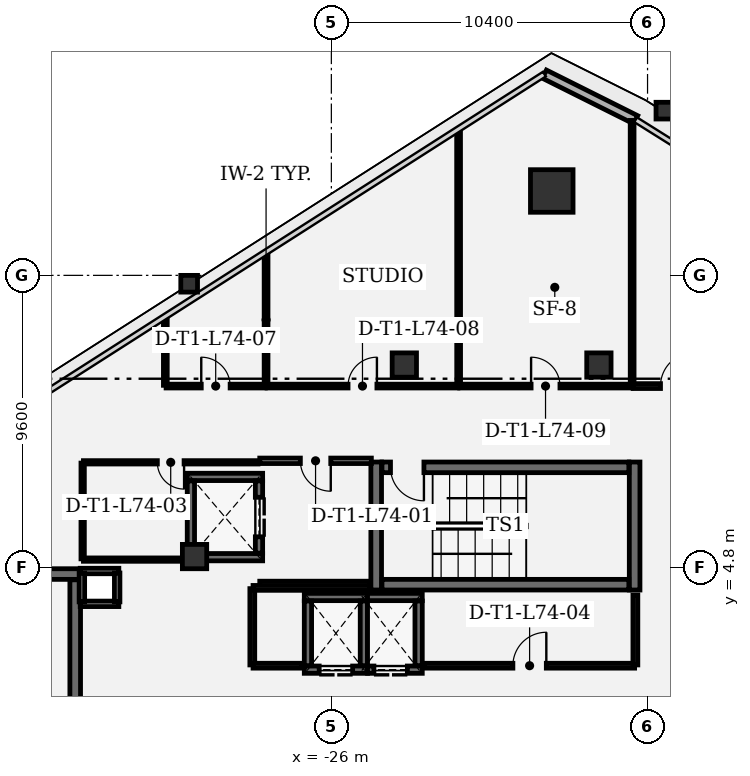
"""IFC4 building model, lengths in metres.
Left out: names, types, materials, properties, quantities, classifications, styles, units other than length and angle.
Written with IfcOpenShell. Run it as: python <this file> out.ifc"""

import sys

from ifc_helpers import new_model, si_unit, direction, frame, frame_2d, origin, origin_2d, place, context, subcontext, project, spatial, rectangle, extrude, element, fill, save


model = new_model("IFC4")
c1 = context("Model", 3, precision=1e-05, world=origin(), true_north=direction((0.0, 1.0)))
c2 = subcontext(c1, "Body", "Model", "MODEL_VIEW")
j1 = project(units=[si_unit("LENGTHUNIT", "METRE"), si_unit("PLANEANGLEUNIT", "RADIAN")], contexts=[c1])
p1 = place(None, origin())
s1 = spatial("IfcSite", under=j1, at=p1, CompositionType="ELEMENT")
p2 = place(p1, origin())
s2 = spatial("IfcBuilding", under=s1, at=p2, CompositionType="ELEMENT")
p3 = place(p2, frame((0.0, 0.0, 318.6)))
s3 = spatial("IfcBuildingStorey", under=s2, at=p3, CompositionType="ELEMENT", Elevation=318.6)
p4 = place(p3, frame((-18.75, 17.176, 0.0), z_axis=(0.0, 0.0, 1.0), x_axis=(1.0, 0.0, 0.0)))
e1 = element("IfcColumn", 1, at=p4, inside=s3, PredefinedType="COLUMN", context=c2, shape_type="SweptSolid", body=[
    extrude(rectangle(XDim=1.4, YDim=1.4, at=origin_2d()), origin(), (0.0, 0.0, 1.0), 4.2),
])
for number, where, z_axis, x_axis in (
    (2, (-23.6, 11.45, 0.0), (0.0, 0.0, 1.0), (1.0, 0.0, 0.0)),
    (3, (-17.2, 11.45, 0.0), (0.0, 0.0, 1.0), (1.0, 0.0, 0.0)),
    (4, (-30.5, 5.15, 0.0), (0.0, 0.0, 1.0), (1.0, 0.0, 0.0)),
):
    element("IfcColumn", number, at=place(p3, frame(where, z_axis=z_axis, x_axis=x_axis)), inside=s3, PredefinedType="COLUMN", context=c2, shape_type="SweptSolid", body=[
        extrude(rectangle(XDim=0.8, YDim=0.8, at=origin_2d()), origin(), (0.0, 0.0, 1.0), 4.2),
    ])
for number, where, z_axis, x_axis in (
    (5, (-30.677, 14.124, 0.0), (0.0, 0.0, 1.0), (1.0, 0.0, 0.0)),
    (6, (-15.046, 19.818, 0.0), (0.0, 0.0, 1.0), (1.0, 0.0, 0.0)),
):
    element("IfcColumn", number, at=place(p3, frame(where, z_axis=z_axis, x_axis=x_axis)), inside=s3, PredefinedType="COLUMN", context=c2, shape_type="SweptSolid", body=[
        extrude(rectangle(XDim=0.55, YDim=0.55, at=origin_2d()), origin(), (0.0, 0.0, 1.0), 4.2),
    ])
p5 = place(p3, frame((-18.993, 21.019, 0.0), z_axis=(0.0, 0.0, 1.0), x_axis=(0.894441735477, -0.447184505362, 0.0)))
e7 = element("IfcWall", 7, at=p5, inside=s3, PredefinedType="SOLIDWALL", context=c2, shape_type="SweptSolid", body=[
    extrude(rectangle(XDim=3.357, YDim=0.3, at=frame_2d((1.678, 0.0))), origin(), (0.0, 0.0, 1.0), 3.91),
])
for number, where, z_axis, x_axis in (
    (8, (-24.525, 8.26, 0.0), (0.0, 0.0, 1.0), (0.0, -1.0, 0.0)),
    (9, (-16.025, 4.05, 0.0), (0.0, 0.0, 1.0), (0.0, 1.0, 0.0)),
):
    element("IfcWall", number, at=place(p3, frame(where, z_axis=z_axis, x_axis=x_axis)), inside=s3, PredefinedType="SHEAR", context=c2, shape_type="SweptSolid", body=[
        extrude(rectangle(XDim=4.21, YDim=0.35, at=frame_2d((2.105, 0.0))), origin(), (0.0, 0.0, 1.0), 3.91),
    ])
p6 = place(p3, frame((-24.335, 4.225, 0.0), z_axis=(0.0, 0.0, 1.0), x_axis=(1.0, 0.0, 0.0)))
e10 = element("IfcWall", 10, at=p6, inside=s3, PredefinedType="SHEAR", context=c2, shape_type="SweptSolid", body=[
    extrude(rectangle(XDim=8.12, YDim=0.35, at=frame_2d((4.06, 0.0))), origin(), (0.0, 0.0, 1.0), 3.91),
])
p7 = place(p3, frame((-16.215, 8.085, 0.0), z_axis=(0.0, 0.0, 1.0), x_axis=(-1.0, 0.0, 0.0)))
e11 = element("IfcWall", 11, at=p7, inside=s3, PredefinedType="SHEAR", context=c2, shape_type="SweptSolid", body=[
    extrude(rectangle(XDim=8.12, YDim=0.35, at=frame_2d((4.06, 0.0))), origin(), (0.0, 0.0, 1.0), 3.91),
])
p8 = place(p7, frame((6.74, 0.0, 0.0)))
e12 = element("IfcOpeningElement", 12, at=p8, cuts=e11, PredefinedType="OPENING", context=c2, shape_type="SweptSolid", body=[
    extrude(rectangle(XDim=1.1, YDim=2.2, at=frame_2d((0.55, 1.1))), frame((0.0, 0.185, 0.0), z_axis=(0.0, -1.0, 0.0), x_axis=(1.0, 0.0, 0.0)), (0.0, 0.0, 1.0), 0.37),
])
p9 = place(p3, frame((-34.25, 4.575, 0.0), z_axis=(0.0, 0.0, 1.0), x_axis=(-1.0, 0.0, 0.0)))
e13 = element("IfcWall", 13, at=p9, inside=s3, PredefinedType="SHEAR", context=c2, shape_type="SweptSolid", body=[
    extrude(rectangle(XDim=4.21, YDim=0.35, at=frame_2d((2.105, 0.0))), origin(), (0.0, 0.0, 1.0), 3.91),
])
p10 = place(p3, frame((-34.425, -4.385, 0.0), z_axis=(0.0, 0.0, 1.0), x_axis=(0.0, 1.0, 0.0)))
e14 = element("IfcWall", 14, at=p10, inside=s3, PredefinedType="SHEAR", context=c2, shape_type="SweptSolid", body=[
    extrude(rectangle(XDim=8.77, YDim=0.35, at=frame_2d((4.385, 0.0))), origin(), (0.0, 0.0, 1.0), 3.91),
])
for number, where, z_axis, x_axis in (
    (15, (-28.26, 5.13, 0.0), (0.0, 0.0, 1.0), (-1.0, 0.0, 0.0)),
    (16, (-30.74, 7.77, 0.0), (0.0, 0.0, 1.0), (1.0, 0.0, 0.0)),
):
    element("IfcWall", number, at=place(p3, frame(where, z_axis=z_axis, x_axis=x_axis)), inside=s3, PredefinedType="SHEAR", context=c2, shape_type="SweptSolid", body=[
        extrude(rectangle(XDim=2.48, YDim=0.24, at=frame_2d((1.24, 0.0))), origin(), (0.0, 0.0, 1.0), 3.91),
    ])
p11 = place(p3, frame((-30.62, 5.262, 0.0), z_axis=(0.0, 0.0, 1.0), x_axis=(0.0, 1.0, 0.0)))
e17 = element("IfcWall", 17, at=p11, inside=s3, PredefinedType="SHEAR", context=c2, shape_type="SweptSolid", body=[
    extrude(rectangle(XDim=2.376, YDim=0.24, at=frame_2d((1.188, 0.0))), origin(), (0.0, 0.0, 1.0), 3.91),
])
p12 = place(p3, frame((-28.38, 7.638, 0.0), z_axis=(0.0, 0.0, 1.0), x_axis=(0.0, -1.0, 0.0)))
e18 = element("IfcWall", 18, at=p12, inside=s3, PredefinedType="SHEAR", context=c2, shape_type="SweptSolid", body=[
    extrude(rectangle(XDim=2.376, YDim=0.24, at=frame_2d((1.188, 0.0))), origin(), (0.0, 0.0, 1.0), 3.91),
])
p13 = place(p12, frame((0.538, 0.0, 0.0)))
e19 = element("IfcOpeningElement", 19, at=p13, cuts=e18, PredefinedType="OPENING", context=c2, shape_type="SweptSolid", body=[
    extrude(rectangle(XDim=1.3, YDim=2.3, at=frame_2d((0.65, 1.15))), frame((0.0, 0.13, 0.0), z_axis=(0.0, -1.0, 0.0), x_axis=(1.0, 0.0, 0.0)), (0.0, 0.0, 1.0), 0.26),
])
p14 = place(p3, frame((-24.81, 1.43, 0.0), z_axis=(0.0, 0.0, 1.0), x_axis=(-1.0, 0.0, 0.0)))
e20 = element("IfcWall", 20, at=p14, inside=s3, PredefinedType="SHEAR", context=c2, shape_type="SweptSolid", body=[
    extrude(rectangle(XDim=2.08, YDim=0.24, at=frame_2d((1.04, 0.0))), origin(), (0.0, 0.0, 1.0), 3.91),
])
p15 = place(p14, frame((0.49, 0.0, 0.0)))
e21 = element("IfcOpeningElement", 21, at=p15, cuts=e20, PredefinedType="OPENING", context=c2, shape_type="SweptSolid", body=[
    extrude(rectangle(XDim=1.1, YDim=2.2, at=frame_2d((0.55, 1.1))), frame((0.0, 0.13, 0.0), z_axis=(0.0, -1.0, 0.0), x_axis=(1.0, 0.0, 0.0)), (0.0, 0.0, 1.0), 0.26),
])
p16 = place(p3, frame((-26.89, 3.82, 0.0), z_axis=(0.0, 0.0, 1.0), x_axis=(1.0, 0.0, 0.0)))
e22 = element("IfcWall", 22, at=p16, inside=s3, PredefinedType="SHEAR", context=c2, shape_type="SweptSolid", body=[
    extrude(rectangle(XDim=2.08, YDim=0.24, at=frame_2d((1.04, 0.0))), origin(), (0.0, 0.0, 1.0), 3.91),
])
for number, where, z_axis, x_axis in (
    (23, (-26.77, 1.562, 0.0), (0.0, 0.0, 1.0), (0.0, 1.0, 0.0)),
    (24, (-24.93, 3.688, 0.0), (0.0, 0.0, 1.0), (0.0, -1.0, 0.0)),
):
    element("IfcWall", number, at=place(p3, frame(where, z_axis=z_axis, x_axis=x_axis)), inside=s3, PredefinedType="SHEAR", context=c2, shape_type="SweptSolid", body=[
        extrude(rectangle(XDim=2.126, YDim=0.24, at=frame_2d((1.063, 0.0))), origin(), (0.0, 0.0, 1.0), 3.91),
    ])
p17 = place(p3, frame((-23.01, 1.43, 0.0), z_axis=(0.0, 0.0, 1.0), x_axis=(-1.0, 0.0, 0.0)))
e25 = element("IfcWall", 25, at=p17, inside=s3, PredefinedType="SHEAR", context=c2, shape_type="SweptSolid", body=[
    extrude(rectangle(XDim=1.8, YDim=0.24, at=frame_2d((0.9, 0.0))), origin(), (0.0, 0.0, 1.0), 3.91),
])
p18 = place(p17, frame((0.49, 0.0, 0.0)))
e26 = element("IfcOpeningElement", 26, at=p18, cuts=e25, PredefinedType="OPENING", context=c2, shape_type="SweptSolid", body=[
    extrude(rectangle(XDim=1.1, YDim=2.2, at=frame_2d((0.55, 1.1))), frame((0.0, 0.13, 0.0), z_axis=(0.0, -1.0, 0.0), x_axis=(1.0, 0.0, 0.0)), (0.0, 0.0, 1.0), 0.26),
])
p19 = place(p3, frame((-24.81, 3.82, 0.0), z_axis=(0.0, 0.0, 1.0), x_axis=(1.0, 0.0, 0.0)))
e27 = element("IfcWall", 27, at=p19, inside=s3, PredefinedType="SHEAR", context=c2, shape_type="SweptSolid", body=[
    extrude(rectangle(XDim=1.8, YDim=0.24, at=frame_2d((0.9, 0.0))), origin(), (0.0, 0.0, 1.0), 3.91),
])
p20 = place(p3, frame((-23.13, 3.688, 0.0), z_axis=(0.0, 0.0, 1.0), x_axis=(0.0, -1.0, 0.0)))
e28 = element("IfcWall", 28, at=p20, inside=s3, PredefinedType="SHEAR", context=c2, shape_type="SweptSolid", body=[
    extrude(rectangle(XDim=2.126, YDim=0.24, at=frame_2d((1.063, 0.0))), origin(), (0.0, 0.0, 1.0), 3.91),
])
for number, where, z_axis, x_axis in (
    (29, (-32.99, 3.595, 0.0), (0.0, 0.0, 1.0), (-1.0, 0.0, 0.0)),
    (30, (-34.26, 4.675, 0.0), (0.0, 0.0, 1.0), (1.0, 0.0, 0.0)),
):
    element("IfcWall", number, at=place(p3, frame(where, z_axis=z_axis, x_axis=x_axis)), inside=s3, PredefinedType="PARTITIONING", context=c2, shape_type="SweptSolid", body=[
        extrude(rectangle(XDim=1.27, YDim=0.18, at=frame_2d((0.635, 0.0))), origin(), (0.0, 0.0, 1.0), 3.91),
    ])
for number, where, z_axis, x_axis in (
    (31, (-34.205, 3.66, 0.0), (0.0, 0.0, 1.0), (0.0, 1.0, 0.0)),
    (32, (-33.045, 4.61, 0.0), (0.0, 0.0, 1.0), (0.0, -1.0, 0.0)),
):
    element("IfcWall", number, at=place(p3, frame(where, z_axis=z_axis, x_axis=x_axis)), inside=s3, PredefinedType="PARTITIONING", context=c2, shape_type="SweptSolid", body=[
        extrude(rectangle(XDim=0.95, YDim=0.18, at=frame_2d((0.475, 0.0))), origin(), (0.0, 0.0, 1.0), 3.91),
    ])
p21 = place(p3, frame((-28.355, 4.25, 0.0), z_axis=(0.0, 0.0, 1.0), x_axis=(1.0, 0.0, 0.0)))
e33 = element("IfcWall", 33, at=p21, inside=s3, PredefinedType="PARTITIONING", context=c2, shape_type="SweptSolid", body=[
    extrude(rectangle(XDim=3.622, YDim=0.18, at=frame_2d((1.811, 0.0))), origin(), (0.0, 0.0, 1.0), 3.91),
])
p22 = place(p3, frame((-24.684, 8.3, 0.0), z_axis=(0.0, 0.0, 1.0), x_axis=(-1.0, 0.0, 0.0)))
e34 = element("IfcWall", 34, at=p22, inside=s3, PredefinedType="PARTITIONING", context=c2, shape_type="SweptSolid", body=[
    extrude(rectangle(XDim=3.671, YDim=0.18, at=frame_2d((1.835, 0.0))), origin(), (0.0, 0.0, 1.0), 3.529),
])
p23 = place(p22, frame((1.335, 0.0, 0.0)))
e35 = element("IfcOpeningElement", 35, at=p23, cuts=e34, PredefinedType="OPENING", context=c2, shape_type="SweptSolid", body=[
    extrude(rectangle(XDim=1.0, YDim=2.15, at=frame_2d((0.5, 1.075))), frame((0.0, 0.1, 0.0), z_axis=(0.0, -1.0, 0.0), x_axis=(1.0, 0.0, 0.0)), (0.0, 0.0, 1.0), 0.2),
])
p24 = place(p3, frame((-34.18, 8.225, 0.0), z_axis=(0.0, 0.0, 1.0), x_axis=(0.0, -1.0, 0.0)))
e36 = element("IfcWall", 36, at=p24, inside=s3, PredefinedType="PARTITIONING", context=c2, shape_type="SweptSolid", body=[
    extrude(rectangle(XDim=3.15, YDim=0.11, at=frame_2d((1.575, 0.0))), origin(), (0.0, 0.0, 1.0), 3.91),
])
p25 = place(p3, frame((-34.155, 5.05, 0.0), z_axis=(0.0, 0.0, 1.0), x_axis=(1.0, 0.0, 0.0)))
e37 = element("IfcWall", 37, at=p25, inside=s3, PredefinedType="PARTITIONING", context=c2, shape_type="SweptSolid", body=[
    extrude(rectangle(XDim=3.19, YDim=0.11, at=frame_2d((1.595, 0.0))), origin(), (0.0, 0.0, 1.0), 3.91),
])
p26 = place(p3, frame((-28.413, 8.25, 0.0), z_axis=(0.0, 0.0, 1.0), x_axis=(-1.0, 0.0, 0.0)))
e38 = element("IfcWall", 38, at=p26, inside=s3, PredefinedType="PARTITIONING", context=c2, shape_type="SweptSolid", body=[
    extrude(rectangle(XDim=5.742, YDim=0.11, at=frame_2d((2.871, 0.0))), origin(), (0.0, 0.0, 1.0), 3.13),
])
p27 = place(p26, frame((2.431, 0.0, 0.0)))
e39 = element("IfcOpeningElement", 39, at=p27, cuts=e38, PredefinedType="OPENING", context=c2, shape_type="SweptSolid", body=[
    extrude(rectangle(XDim=0.88, YDim=2.1, at=frame_2d((0.44, 1.05))), frame((0.0, 0.065, 0.0), z_axis=(0.0, -1.0, 0.0), x_axis=(1.0, 0.0, 0.0)), (0.0, 0.0, 1.0), 0.13),
])
p28 = place(p3, frame((-28.6, 4.095, 0.0), z_axis=(0.0, 0.0, 1.0), x_axis=(0.0, -1.0, 0.0)))
e40 = element("IfcWall", 40, at=p28, inside=s3, PredefinedType="PARTITIONING", context=c2, shape_type="SweptSolid", body=[
    extrude(rectangle(XDim=2.51, YDim=0.16, at=frame_2d((1.255, 0.0))), origin(), (0.0, 0.0, 1.0), 3.91),
])
p29 = place(p3, frame((-28.575, 1.56, 0.0), z_axis=(0.0, 0.0, 1.0), x_axis=(1.0, 0.0, 0.0)))
e41 = element("IfcWall", 41, at=p29, inside=s3, PredefinedType="PARTITIONING", context=c2, shape_type="SweptSolid", body=[
    extrude(rectangle(XDim=1.609, YDim=0.16, at=frame_2d((0.805, 0.0))), origin(), (0.0, 0.0, 1.0), 3.91),
])
p30 = place(p3, frame((-22.934, 1.56, 0.0), z_axis=(0.0, 0.0, 1.0), x_axis=(1.0, 0.0, 0.0)))
e42 = element("IfcWall", 42, at=p30, inside=s3, PredefinedType="PARTITIONING", context=c2, shape_type="SweptSolid", body=[
    extrude(rectangle(XDim=6.909, YDim=0.16, at=frame_2d((3.455, 0.0))), origin(), (0.0, 0.0, 1.0), 3.91),
])
p31 = place(p30, frame((2.905, 0.0, 0.0)))
e43 = element("IfcOpeningElement", 43, at=p31, cuts=e42, PredefinedType="OPENING", context=c2, shape_type="SweptSolid", body=[
    extrude(rectangle(XDim=1.1, YDim=2.15, at=frame_2d((0.55, 1.075))), frame((0.0, 0.09, 0.0), z_axis=(0.0, -1.0, 0.0), x_axis=(1.0, 0.0, 0.0)), (0.0, 0.0, 1.0), 0.18),
])
p32 = place(p3, frame((-16.0, 1.585, 0.0), z_axis=(0.0, 0.0, 1.0), x_axis=(0.0, 1.0, 0.0)))
e44 = element("IfcWall", 44, at=p32, inside=s3, PredefinedType="PARTITIONING", context=c2, shape_type="SweptSolid", body=[
    extrude(rectangle(XDim=2.302, YDim=0.16, at=frame_2d((1.151, 0.0))), origin(), (0.0, 0.0, 1.0), 3.91),
])
p33 = place(p3, frame((-24.733, 4.12, 0.0), z_axis=(0.0, 0.0, 1.0), x_axis=(-1.0, 0.0, 0.0)))
e45 = element("IfcWall", 45, at=p33, inside=s3, PredefinedType="PARTITIONING", context=c2, shape_type="SweptSolid", body=[
    extrude(rectangle(XDim=3.842, YDim=0.16, at=frame_2d((1.921, 0.0))), origin(), (0.0, 0.0, 1.0), 3.91),
])
p34 = place(p3, frame((-31.436, 10.758, 0.0), z_axis=(0.0, 0.0, 1.0), x_axis=(1.0, 0.0, 0.0)))
e46 = element("IfcWall", 46, at=p34, inside=s3, PredefinedType="PARTITIONING", context=c2, shape_type="SweptSolid", body=[
    extrude(rectangle(XDim=3.264, YDim=0.125, at=frame_2d((1.632, 0.0))), origin(), (0.0, 0.0, 1.0), 3.13),
])
p35 = place(p34, frame((1.157, 0.0, 0.0)))
e47 = element("IfcOpeningElement", 47, at=p35, cuts=e46, PredefinedType="OPENING", context=c2, shape_type="SweptSolid", body=[
    extrude(rectangle(XDim=0.95, YDim=2.15, at=frame_2d((0.475, 1.075))), frame((0.0, 0.073, 0.0), z_axis=(0.0, -1.0, 0.0), x_axis=(1.0, 0.0, 0.0)), (0.0, 0.0, 1.0), 0.145),
])
p36 = place(p3, frame((-28.147, 10.783, 0.0), z_axis=(0.0, 0.0, 1.0), x_axis=(0.0, 1.0, 0.0)))
e48 = element("IfcWall", 48, at=p36, inside=s3, PredefinedType="PARTITIONING", context=c2, shape_type="SweptSolid", body=[
    extrude(rectangle(XDim=4.306, YDim=0.125, at=frame_2d((2.153, 0.0))), origin(), (0.0, 0.0, 1.0), 3.91),
])
p37 = place(p3, frame((-31.461, 12.971, 0.0), z_axis=(0.0, 0.0, 1.0), x_axis=(0.0, -1.0, 0.0)))
e49 = element("IfcWall", 49, at=p37, inside=s3, PredefinedType="PARTITIONING", context=c2, shape_type="SweptSolid", body=[
    extrude(rectangle(XDim=2.188, YDim=0.125, at=frame_2d((1.094, 0.0))), origin(), (0.0, 0.0, 1.0), 3.91),
])
p38 = place(p3, frame((-28.115, 10.758, 0.0), z_axis=(0.0, 0.0, 1.0), x_axis=(1.0, 0.0, 0.0)))
e50 = element("IfcWall", 50, at=p38, inside=s3, PredefinedType="PARTITIONING", context=c2, shape_type="SweptSolid", body=[
    extrude(rectangle(XDim=6.277, YDim=0.125, at=frame_2d((3.138, 0.0))), origin(), (0.0, 0.0, 1.0), 3.91),
])
p39 = place(p38, frame((2.663, 0.0, 0.0)))
e51 = element("IfcOpeningElement", 51, at=p39, cuts=e50, PredefinedType="OPENING", context=c2, shape_type="SweptSolid", body=[
    extrude(rectangle(XDim=0.95, YDim=2.15, at=frame_2d((0.475, 1.075))), frame((0.0, 0.073, 0.0), z_axis=(0.0, -1.0, 0.0), x_axis=(1.0, 0.0, 0.0)), (0.0, 0.0, 1.0), 0.145),
])
p40 = place(p3, frame((-21.813, 10.783, 0.0), z_axis=(0.0, 0.0, 1.0), x_axis=(-0.000292295089, 0.999999957282, 0.0)))
e52 = element("IfcWall", 52, at=p40, inside=s3, PredefinedType="PARTITIONING", context=c2, shape_type="SweptSolid", body=[
    extrude(rectangle(XDim=8.353, YDim=0.125, at=frame_2d((4.176, 0.0))), origin(), (0.0, 0.0, 1.0), 3.91),
])
p41 = place(p3, frame((-21.78, 10.758, 0.0), z_axis=(0.0, 0.0, 1.0), x_axis=(1.0, 0.0, 0.0)))
e53 = element("IfcWall", 53, at=p41, inside=s3, PredefinedType="PARTITIONING", context=c2, shape_type="SweptSolid", body=[
    extrude(rectangle(XDim=5.649, YDim=0.125, at=frame_2d((2.824, 0.0))), origin(), (0.0, 0.0, 1.0), 3.529),
])
p42 = place(p41, frame((2.349, 0.0, 0.0)))
e54 = element("IfcOpeningElement", 54, at=p42, cuts=e53, PredefinedType="OPENING", context=c2, shape_type="SweptSolid", body=[
    extrude(rectangle(XDim=0.95, YDim=2.15, at=frame_2d((0.475, 1.075))), frame((0.0, 0.073, 0.0), z_axis=(0.0, -1.0, 0.0), x_axis=(1.0, 0.0, 0.0)), (0.0, 0.0, 1.0), 0.145),
])
p43 = place(p3, frame((-16.106, 10.783, 0.0), z_axis=(0.0, 0.0, 1.0), x_axis=(-0.000112079351, 0.999999993719, 0.0)))
e55 = element("IfcWall", 55, at=p43, inside=s3, PredefinedType="PARTITIONING", context=c2, shape_type="SweptSolid", body=[
    extrude(rectangle(XDim=8.713, YDim=0.125, at=frame_2d((4.356, 0.0))), origin(), (0.0, 0.0, 1.0), 3.13),
])
p44 = place(p3, frame((-16.073, 10.758, 0.0), z_axis=(0.0, 0.0, 1.0), x_axis=(1.0, 0.0, 0.0)))
e56 = element("IfcWall", 56, at=p44, inside=s3, PredefinedType="PARTITIONING", context=c2, shape_type="SweptSolid", body=[
    extrude(rectangle(XDim=2.899, YDim=0.16, at=frame_2d((1.449, 0.0))), origin(), (0.0, 0.0, 1.0), 3.91),
])
p45 = place(p44, frame((0.899, 0.0, 0.0)))
e57 = element("IfcOpeningElement", 57, at=p45, cuts=e56, PredefinedType="OPENING", context=c2, shape_type="SweptSolid", body=[
    extrude(rectangle(XDim=1.1, YDim=2.15, at=frame_2d((0.55, 1.075))), frame((0.0, 0.09, 0.0), z_axis=(0.0, -1.0, 0.0), x_axis=(1.0, 0.0, 0.0)), (0.0, 0.0, 1.0), 0.18),
])
p46 = place(p8, origin())
e58 = element("IfcDoor", 58, at=p46, inside=s3, OperationType="SINGLE_SWING_LEFT", PredefinedType="DOOR", context=c2, shape_type="SweptSolid", body=[
    extrude(rectangle(XDim=1.1, YDim=2.2, at=frame_2d((0.55, 1.1))), frame((0.0, 0.025, 0.0), z_axis=(0.0, -1.0, 0.0), x_axis=(1.0, 0.0, 0.0)), (0.0, 0.0, 1.0), 0.05),
])
fill(e12, e58)
p47 = place(p13, origin())
e59 = element("IfcDoor", 59, at=p47, inside=s3, OperationType="DOUBLE_DOOR_SLIDING", PredefinedType="DOOR", context=c2, shape_type="SweptSolid", body=[
    extrude(rectangle(XDim=1.3, YDim=2.3, at=frame_2d((0.65, 1.15))), frame((0.0, 0.025, 0.0), z_axis=(0.0, -1.0, 0.0), x_axis=(1.0, 0.0, 0.0)), (0.0, 0.0, 1.0), 0.05),
])
fill(e19, e59)
p48 = place(p15, origin())
e60 = element("IfcDoor", 60, at=p48, inside=s3, OperationType="DOUBLE_DOOR_SLIDING", PredefinedType="DOOR", context=c2, shape_type="SweptSolid", body=[
    extrude(rectangle(XDim=1.1, YDim=2.2, at=frame_2d((0.55, 1.1))), frame((0.0, 0.025, 0.0), z_axis=(0.0, -1.0, 0.0), x_axis=(1.0, 0.0, 0.0)), (0.0, 0.0, 1.0), 0.05),
])
fill(e21, e60)
p49 = place(p18, origin())
e61 = element("IfcDoor", 61, at=p49, inside=s3, OperationType="DOUBLE_DOOR_SLIDING", PredefinedType="DOOR", context=c2, shape_type="SweptSolid", body=[
    extrude(rectangle(XDim=1.1, YDim=2.2, at=frame_2d((0.55, 1.1))), frame((0.0, 0.025, 0.0), z_axis=(0.0, -1.0, 0.0), x_axis=(1.0, 0.0, 0.0)), (0.0, 0.0, 1.0), 0.05),
])
fill(e26, e61)
p50 = place(p23, origin())
e62 = element("IfcDoor", 62, at=p50, inside=s3, OperationType="SINGLE_SWING_LEFT", PredefinedType="DOOR", context=c2, shape_type="SweptSolid", body=[
    extrude(rectangle(XDim=1.0, YDim=2.15, at=frame_2d((0.5, 1.075))), frame((0.0, 0.025, 0.0), z_axis=(0.0, -1.0, 0.0), x_axis=(1.0, 0.0, 0.0)), (0.0, 0.0, 1.0), 0.05),
])
fill(e35, e62)
p51 = place(p27, origin())
e63 = element("IfcDoor", 63, at=p51, inside=s3, OperationType="SINGLE_SWING_LEFT", PredefinedType="DOOR", context=c2, shape_type="SweptSolid", body=[
    extrude(rectangle(XDim=0.88, YDim=2.1, at=frame_2d((0.44, 1.05))), frame((0.0, 0.025, 0.0), z_axis=(0.0, -1.0, 0.0), x_axis=(1.0, 0.0, 0.0)), (0.0, 0.0, 1.0), 0.05),
])
fill(e39, e63)
p52 = place(p31, origin())
e64 = element("IfcDoor", 64, at=p52, inside=s3, OperationType="SINGLE_SWING_RIGHT", PredefinedType="DOOR", context=c2, shape_type="SweptSolid", body=[
    extrude(rectangle(XDim=1.1, YDim=2.15, at=frame_2d((0.55, 1.075))), frame((0.0, 0.025, 0.0), z_axis=(0.0, -1.0, 0.0), x_axis=(1.0, 0.0, 0.0)), (0.0, 0.0, 1.0), 0.05),
])
fill(e43, e64)
p53 = place(p35, origin())
e65 = element("IfcDoor", 65, at=p53, inside=s3, OperationType="SINGLE_SWING_LEFT", PredefinedType="DOOR", context=c2, shape_type="SweptSolid", body=[
    extrude(rectangle(XDim=0.95, YDim=2.15, at=frame_2d((0.475, 1.075))), frame((0.0, 0.025, 0.0), z_axis=(0.0, -1.0, 0.0), x_axis=(1.0, 0.0, 0.0)), (0.0, 0.0, 1.0), 0.05),
])
fill(e47, e65)
p54 = place(p39, origin())
e66 = element("IfcDoor", 66, at=p54, inside=s3, OperationType="SINGLE_SWING_RIGHT", PredefinedType="DOOR", context=c2, shape_type="SweptSolid", body=[
    extrude(rectangle(XDim=0.95, YDim=2.15, at=frame_2d((0.475, 1.075))), frame((0.0, 0.025, 0.0), z_axis=(0.0, -1.0, 0.0), x_axis=(1.0, 0.0, 0.0)), (0.0, 0.0, 1.0), 0.05),
])
fill(e51, e66)
p55 = place(p42, origin())
e67 = element("IfcDoor", 67, at=p55, inside=s3, OperationType="SINGLE_SWING_LEFT", PredefinedType="DOOR", context=c2, shape_type="SweptSolid", body=[
    extrude(rectangle(XDim=0.95, YDim=2.15, at=frame_2d((0.475, 1.075))), frame((0.0, 0.025, 0.0), z_axis=(0.0, -1.0, 0.0), x_axis=(1.0, 0.0, 0.0)), (0.0, 0.0, 1.0), 0.05),
])
fill(e54, e67)
p56 = place(p45, origin())
e68 = element("IfcDoor", 68, at=p56, inside=s3, OperationType="SINGLE_SWING_RIGHT", PredefinedType="DOOR", context=c2, shape_type="SweptSolid", body=[
    extrude(rectangle(XDim=1.1, YDim=2.15, at=frame_2d((0.55, 1.075))), frame((0.0, 0.025, 0.0), z_axis=(0.0, -1.0, 0.0), x_axis=(1.0, 0.0, 0.0)), (0.0, 0.0, 1.0), 0.05),
])
fill(e57, e68)
save(model, sys.argv[1])
